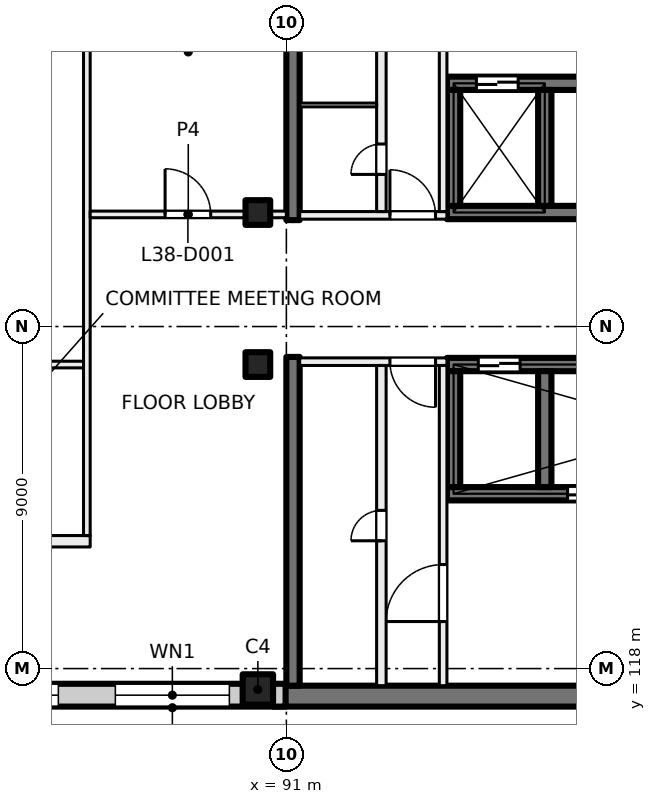
"""IFC4 building model, lengths in metres.
Left out: names, types, materials, properties, quantities, classifications, styles, units other than length and angle.
Written with IfcOpenShell. Run it as: python <this file> out.ifc"""

import sys

from ifc_helpers import new_model, si_unit, direction, frame, frame_2d, origin, origin_2d, place, context, subcontext, project, spatial, rectangle, extrude, element, fill, save


model = new_model("IFC4")
c1 = context("Model", 3, precision=1e-05, world=origin(), true_north=direction((0.0, 1.0)))
c2 = subcontext(c1, "Body", "Model", "MODEL_VIEW")
j1 = project(units=[si_unit("LENGTHUNIT", "METRE"), si_unit("PLANEANGLEUNIT", "RADIAN")], contexts=[c1])
p1 = place(None, origin())
s1 = spatial("IfcSite", under=j1, at=p1, CompositionType="ELEMENT")
p2 = place(p1, origin())
s2 = spatial("IfcBuilding", under=s1, at=p2, CompositionType="ELEMENT")
p3 = place(p2, frame((0.0, 0.0, 162.5)))
s3 = spatial("IfcBuildingStorey", under=s2, at=p3, CompositionType="ELEMENT", Elevation=162.5)
for number, where, z_axis, x_axis in (
    (1, (90.25, 130.0, 0.0), (0.0, 0.0, 1.0), (1.0, 0.0, 0.0)),
    (2, (90.25, 126.0, 0.0), (0.0, 0.0, 1.0), (1.0, 0.0, 0.0)),
):
    element("IfcColumn", number, at=place(p3, frame(where, z_axis=z_axis, x_axis=x_axis)), inside=s3, PredefinedType="COLUMN", context=c2, shape_type="SweptSolid", body=[
        extrude(rectangle(XDim=0.65, YDim=0.65, at=origin_2d()), origin(), (0.0, 0.0, 1.0), 4.0),
    ])
p4 = place(p3, frame((90.25, 117.45, 0.0), z_axis=(0.0, 0.0, 1.0), x_axis=(1.0, 0.0, 0.0)))
e3 = element("IfcColumn", 3, at=p4, inside=s3, PredefinedType="COLUMN", context=c2, shape_type="SweptSolid", body=[
    extrude(rectangle(XDim=0.8, YDim=0.8, at=origin_2d()), origin(), (0.0, 0.0, 1.0), 4.0),
])
p5 = place(p3, frame((99.6, 117.275, 0.0), z_axis=(0.0, 0.0, 1.0), x_axis=(-1.0, 0.0, 0.0)))
e4 = element("IfcWall", 4, at=p5, inside=s3, PredefinedType="SHEAR", context=c2, shape_type="SweptSolid", body=[
    extrude(rectangle(XDim=8.95, YDim=0.55, at=frame_2d((4.475, 0.0))), origin(), (0.0, 0.0, 1.0), 4.0),
])
p6 = place(p3, frame((107.45, 130.0, 0.0), z_axis=(0.0, 0.0, 1.0), x_axis=(-1.0, 0.0, 0.0)))
e5 = element("IfcWall", 5, at=p6, inside=s3, PredefinedType="SHEAR", context=c2, shape_type="SweptSolid", body=[
    extrude(rectangle(XDim=12.225, YDim=0.35, at=frame_2d((6.112, 0.0))), origin(), (0.0, 0.0, 1.0), 4.0),
])
p7 = place(p6, frame((0.85, 0.0, 0.0)))
e6 = element("IfcOpeningElement", 6, at=p7, cuts=e5, PredefinedType="OPENING", context=c2, shape_type="SweptSolid", body=[
    extrude(rectangle(XDim=0.8, YDim=2.1, at=frame_2d((0.4, 1.05))), frame((0.0, 0.185, 0.0), z_axis=(0.0, -1.0, 0.0), x_axis=(1.0, 0.0, 0.0)), (0.0, 0.0, 1.0), 0.37),
])
p8 = place(p6, frame((5.65, 0.0, 0.0)))
e7 = element("IfcOpeningElement", 7, at=p8, cuts=e5, PredefinedType="OPENING", context=c2, shape_type="SweptSolid", body=[
    extrude(rectangle(XDim=0.8, YDim=2.1, at=frame_2d((0.4, 1.05))), frame((0.0, 0.185, 0.0), z_axis=(0.0, -1.0, 0.0), x_axis=(1.0, 0.0, 0.0)), (0.0, 0.0, 1.0), 0.37),
])
p9 = place(p3, frame((107.45, 133.4, 0.0), z_axis=(0.0, 0.0, 1.0), x_axis=(-1.0, 0.0, 0.0)))
e8 = element("IfcWall", 8, at=p9, inside=s3, PredefinedType="SHEAR", context=c2, shape_type="SweptSolid", body=[
    extrude(rectangle(XDim=12.225, YDim=0.35, at=frame_2d((6.112, 0.0))), origin(), (0.0, 0.0, 1.0), 4.0),
])
p10 = place(p9, frame((10.35, 0.0, 0.0)))
e9 = element("IfcOpeningElement", 9, at=p10, cuts=e8, PredefinedType="OPENING", context=c2, shape_type="SweptSolid", body=[
    extrude(rectangle(XDim=1.1, YDim=2.1, at=frame_2d((0.55, 1.05))), frame((0.0, 0.185, 0.0), z_axis=(0.0, -1.0, 0.0), x_axis=(1.0, 0.0, 0.0)), (0.0, 0.0, 1.0), 0.37),
])
for number, where, z_axis, x_axis in (
    (10, (97.8, 133.225, 0.0), (0.0, 0.0, 1.0), (0.0, -1.0, 0.0)),
    (11, (95.4, 133.225, 0.0), (0.0, 0.0, 1.0), (0.0, -1.0, 0.0)),
):
    element("IfcWall", number, at=place(p3, frame(where, z_axis=z_axis, x_axis=x_axis)), inside=s3, PredefinedType="SHEAR", context=c2, shape_type="SweptSolid", body=[
        extrude(rectangle(XDim=3.05, YDim=0.35, at=frame_2d((1.525, 0.0))), origin(), (0.0, 0.0, 1.0), 4.0),
    ])
p11 = place(p3, frame((107.45, 126.0, 0.0), z_axis=(0.0, 0.0, 1.0), x_axis=(-1.0, 0.0, 0.0)))
e12 = element("IfcWall", 12, at=p11, inside=s3, PredefinedType="SHEAR", context=c2, shape_type="SweptSolid", body=[
    extrude(rectangle(XDim=12.225, YDim=0.35, at=frame_2d((6.112, 0.0))), origin(), (0.0, 0.0, 1.0), 4.0),
])
p12 = place(p11, frame((0.7, 0.0, 0.0)))
e13 = element("IfcOpeningElement", 13, at=p12, cuts=e12, PredefinedType="OPENING", context=c2, shape_type="SweptSolid", body=[
    extrude(rectangle(XDim=1.1, YDim=2.1, at=frame_2d((0.55, 1.05))), frame((0.0, 0.185, 0.0), z_axis=(0.0, -1.0, 0.0), x_axis=(1.0, 0.0, 0.0)), (0.0, 0.0, 1.0), 0.37),
])
p13 = place(p11, frame((3.1, 0.0, 0.0)))
e14 = element("IfcOpeningElement", 14, at=p13, cuts=e12, PredefinedType="OPENING", context=c2, shape_type="SweptSolid", body=[
    extrude(rectangle(XDim=1.1, YDim=2.1, at=frame_2d((0.55, 1.05))), frame((0.0, 0.185, 0.0), z_axis=(0.0, -1.0, 0.0), x_axis=(1.0, 0.0, 0.0)), (0.0, 0.0, 1.0), 0.37),
])
p14 = place(p11, frame((5.5, 0.0, 0.0)))
e15 = element("IfcOpeningElement", 15, at=p14, cuts=e12, PredefinedType="OPENING", context=c2, shape_type="SweptSolid", body=[
    extrude(rectangle(XDim=1.1, YDim=2.1, at=frame_2d((0.55, 1.05))), frame((0.0, 0.185, 0.0), z_axis=(0.0, -1.0, 0.0), x_axis=(1.0, 0.0, 0.0)), (0.0, 0.0, 1.0), 0.37),
])
p15 = place(p11, frame((10.3, 0.0, 0.0)))
e16 = element("IfcOpeningElement", 16, at=p15, cuts=e12, PredefinedType="OPENING", context=c2, shape_type="SweptSolid", body=[
    extrude(rectangle(XDim=1.1, YDim=2.1, at=frame_2d((0.55, 1.05))), frame((0.0, 0.185, 0.0), z_axis=(0.0, -1.0, 0.0), x_axis=(1.0, 0.0, 0.0)), (0.0, 0.0, 1.0), 0.37),
])
p16 = place(p3, frame((107.45, 122.6, 0.0), z_axis=(0.0, 0.0, 1.0), x_axis=(-1.0, 0.0, 0.0)))
e17 = element("IfcWall", 17, at=p16, inside=s3, PredefinedType="SHEAR", context=c2, shape_type="SweptSolid", body=[
    extrude(rectangle(XDim=12.225, YDim=0.35, at=frame_2d((6.112, 0.0))), origin(), (0.0, 0.0, 1.0), 4.0),
])
p17 = place(p16, frame((7.95, 0.0, 0.0)))
e18 = element("IfcOpeningElement", 18, at=p17, cuts=e17, PredefinedType="OPENING", context=c2, shape_type="SweptSolid", body=[
    extrude(rectangle(XDim=1.1, YDim=2.1, at=frame_2d((0.55, 1.05))), frame((0.0, 0.185, 0.0), z_axis=(0.0, -1.0, 0.0), x_axis=(1.0, 0.0, 0.0)), (0.0, 0.0, 1.0), 0.37),
])
for number, where, z_axis, x_axis in (
    (19, (97.8, 125.825, 0.0), (0.0, 0.0, 1.0), (0.0, -1.0, 0.0)),
    (20, (95.4, 125.825, 0.0), (0.0, 0.0, 1.0), (0.0, -1.0, 0.0)),
):
    element("IfcWall", number, at=place(p3, frame(where, z_axis=z_axis, x_axis=x_axis)), inside=s3, PredefinedType="SHEAR", context=c2, shape_type="SweptSolid", body=[
        extrude(rectangle(XDim=3.05, YDim=0.35, at=frame_2d((1.525, 0.0))), origin(), (0.0, 0.0, 1.0), 4.0),
    ])
for number, where, z_axis, x_axis in (
    (21, (91.175, 138.45, 0.0), (0.0, 0.0, 1.0), (0.0, -1.0, 0.0)),
    (22, (91.175, 126.2, 0.0), (0.0, 0.0, 1.0), (0.0, -1.0, 0.0)),
):
    element("IfcWall", number, at=place(p3, frame(where, z_axis=z_axis, x_axis=x_axis)), inside=s3, PredefinedType="SHEAR", context=c2, shape_type="SweptSolid", body=[
        extrude(rectangle(XDim=8.65, YDim=0.35, at=frame_2d((4.325, 0.0))), origin(), (0.0, 0.0, 1.0), 4.0),
    ])
p18 = place(p3, frame((90.98, 117.3, 0.0), z_axis=(0.0, 0.0, 1.0), x_axis=(-1.0, 0.0, 0.0)))
e23 = element("IfcWall", 23, at=p18, inside=s3, PredefinedType="SOLIDWALL", context=c2, shape_type="SweptSolid", body=[
    extrude(rectangle(XDim=33.745, YDim=0.6, at=frame_2d((16.873, 0.0))), origin(), (0.0, 0.0, 1.0), 3.625),
])
p19 = place(p18, frame((1.48, 0.0, 0.9)))
e24 = element("IfcOpeningElement", 24, at=p19, cuts=e23, PredefinedType="OPENING", context=c2, shape_type="SweptSolid", body=[
    extrude(rectangle(XDim=3.0, YDim=2.4, at=frame_2d((1.5, 1.2))), frame((0.0, 0.31, 0.0), z_axis=(0.0, -1.0, 0.0), x_axis=(1.0, 0.0, 0.0)), (0.0, 0.0, 1.0), 0.62),
])
p20 = place(p18, frame((5.98, 0.0, 0.9)))
e25 = element("IfcOpeningElement", 25, at=p20, cuts=e23, PredefinedType="OPENING", context=c2, shape_type="SweptSolid", body=[
    extrude(rectangle(XDim=3.0, YDim=2.4, at=frame_2d((1.5, 1.2))), frame((0.0, 0.31, 0.0), z_axis=(0.0, -1.0, 0.0), x_axis=(1.0, 0.0, 0.0)), (0.0, 0.0, 1.0), 0.62),
])
p21 = place(p18, frame((10.48, 0.0, 0.9)))
e26 = element("IfcOpeningElement", 26, at=p21, cuts=e23, PredefinedType="OPENING", context=c2, shape_type="SweptSolid", body=[
    extrude(rectangle(XDim=3.0, YDim=2.4, at=frame_2d((1.5, 1.2))), frame((0.0, 0.31, 0.0), z_axis=(0.0, -1.0, 0.0), x_axis=(1.0, 0.0, 0.0)), (0.0, 0.0, 1.0), 0.62),
])
p22 = place(p18, frame((14.98, 0.0, 0.9)))
e27 = element("IfcOpeningElement", 27, at=p22, cuts=e23, PredefinedType="OPENING", context=c2, shape_type="SweptSolid", body=[
    extrude(rectangle(XDim=3.0, YDim=2.4, at=frame_2d((1.5, 1.2))), frame((0.0, 0.31, 0.0), z_axis=(0.0, -1.0, 0.0), x_axis=(1.0, 0.0, 0.0)), (0.0, 0.0, 1.0), 0.62),
])
p23 = place(p18, frame((19.48, 0.0, 0.9)))
e28 = element("IfcOpeningElement", 28, at=p23, cuts=e23, PredefinedType="OPENING", context=c2, shape_type="SweptSolid", body=[
    extrude(rectangle(XDim=3.0, YDim=2.4, at=frame_2d((1.5, 1.2))), frame((0.0, 0.31, 0.0), z_axis=(0.0, -1.0, 0.0), x_axis=(1.0, 0.0, 0.0)), (0.0, 0.0, 1.0), 0.62),
])
p24 = place(p18, frame((23.98, 0.0, 0.9)))
e29 = element("IfcOpeningElement", 29, at=p24, cuts=e23, PredefinedType="OPENING", context=c2, shape_type="SweptSolid", body=[
    extrude(rectangle(XDim=3.0, YDim=2.4, at=frame_2d((1.5, 1.2))), frame((0.0, 0.31, 0.0), z_axis=(0.0, -1.0, 0.0), x_axis=(1.0, 0.0, 0.0)), (0.0, 0.0, 1.0), 0.62),
])
p25 = place(p18, frame((28.48, 0.0, 0.9)))
e30 = element("IfcOpeningElement", 30, at=p25, cuts=e23, PredefinedType="OPENING", context=c2, shape_type="SweptSolid", body=[
    extrude(rectangle(XDim=3.0, YDim=2.4, at=frame_2d((1.5, 1.2))), frame((0.0, 0.31, 0.0), z_axis=(0.0, -1.0, 0.0), x_axis=(1.0, 0.0, 0.0)), (0.0, 0.0, 1.0), 0.62),
])
p26 = place(p3, frame((95.225, 126.075, 0.0), z_axis=(0.0, 0.0, 1.0), x_axis=(-1.0, 0.0, 0.0)))
e31 = element("IfcWall", 31, at=p26, inside=s3, PredefinedType="PARTITIONING", context=c2, shape_type="SweptSolid", body=[
    extrude(rectangle(XDim=3.875, YDim=0.2, at=frame_2d((1.938, 0.0))), origin(), (0.0, 0.0, 1.0), 3.625),
])
p27 = place(p26, frame((0.3, 0.0, 0.0)))
e32 = element("IfcOpeningElement", 32, at=p27, cuts=e31, PredefinedType="OPENING", context=c2, shape_type="SweptSolid", body=[
    extrude(rectangle(XDim=1.2, YDim=2.1, at=frame_2d((0.6, 1.05))), frame((0.0, 0.11, 0.0), z_axis=(0.0, -1.0, 0.0), x_axis=(1.0, 0.0, 0.0)), (0.0, 0.0, 1.0), 0.22),
])
p28 = place(p3, frame((95.125, 117.55, 0.0), z_axis=(0.0, 0.0, 1.0), x_axis=(0.0, 1.0, 0.0)))
e33 = element("IfcWall", 33, at=p28, inside=s3, PredefinedType="PARTITIONING", context=c2, shape_type="SweptSolid", body=[
    extrude(rectangle(XDim=8.425, YDim=0.2, at=frame_2d((4.212, 0.0))), origin(), (0.0, 0.0, 1.0), 3.625),
])
p29 = place(p28, frame((1.688, 0.0, 0.0)))
e34 = element("IfcOpeningElement", 34, at=p29, cuts=e33, PredefinedType="OPENING", context=c2, shape_type="SweptSolid", body=[
    extrude(rectangle(XDim=1.5, YDim=2.1, at=frame_2d((0.75, 1.05))), frame((0.0, 0.11, 0.0), z_axis=(0.0, -1.0, 0.0), x_axis=(1.0, 0.0, 0.0)), (0.0, 0.0, 1.0), 0.22),
])
p30 = place(p3, frame((93.5, 117.55, 0.0), z_axis=(0.0, 0.0, 1.0), x_axis=(0.0, 1.0, 0.0)))
e35 = element("IfcWall", 35, at=p30, inside=s3, PredefinedType="PARTITIONING", context=c2, shape_type="SweptSolid", body=[
    extrude(rectangle(XDim=8.425, YDim=0.25, at=frame_2d((4.212, 0.0))), origin(), (0.0, 0.0, 1.0), 3.625),
])
p31 = place(p30, frame((3.812, 0.0, 0.0)))
e36 = element("IfcOpeningElement", 36, at=p31, cuts=e35, PredefinedType="OPENING", context=c2, shape_type="SweptSolid", body=[
    extrude(rectangle(XDim=0.8, YDim=2.1, at=frame_2d((0.4, 1.05))), frame((0.0, 0.135, 0.0), z_axis=(0.0, -1.0, 0.0), x_axis=(1.0, 0.0, 0.0)), (0.0, 0.0, 1.0), 0.27),
])
p32 = place(p3, frame((91.35, 129.925, 0.0), z_axis=(0.0, 0.0, 1.0), x_axis=(1.0, 0.0, 0.0)))
e37 = element("IfcWall", 37, at=p32, inside=s3, PredefinedType="PARTITIONING", context=c2, shape_type="SweptSolid", body=[
    extrude(rectangle(XDim=3.875, YDim=0.2, at=frame_2d((1.938, 0.0))), origin(), (0.0, 0.0, 1.0), 3.625),
])
p33 = place(p32, frame((2.375, 0.0, 0.0)))
e38 = element("IfcOpeningElement", 38, at=p33, cuts=e37, PredefinedType="OPENING", context=c2, shape_type="SweptSolid", body=[
    extrude(rectangle(XDim=1.2, YDim=2.1, at=frame_2d((0.6, 1.05))), frame((0.0, 0.11, 0.0), z_axis=(0.0, -1.0, 0.0), x_axis=(1.0, 0.0, 0.0)), (0.0, 0.0, 1.0), 0.22),
])
p34 = place(p3, frame((95.125, 130.025, 0.0), z_axis=(0.0, 0.0, 1.0), x_axis=(0.0, 1.0, 0.0)))
e39 = element("IfcWall", 39, at=p34, inside=s3, PredefinedType="PARTITIONING", context=c2, shape_type="SweptSolid", body=[
    extrude(rectangle(XDim=8.425, YDim=0.2, at=frame_2d((4.212, 0.0))), origin(), (0.0, 0.0, 1.0), 3.625),
])
p35 = place(p34, frame((5.238, 0.0, 0.0)))
e40 = element("IfcOpeningElement", 40, at=p35, cuts=e39, PredefinedType="OPENING", context=c2, shape_type="SweptSolid", body=[
    extrude(rectangle(XDim=1.5, YDim=2.1, at=frame_2d((0.75, 1.05))), frame((0.0, 0.11, 0.0), z_axis=(0.0, -1.0, 0.0), x_axis=(1.0, 0.0, 0.0)), (0.0, 0.0, 1.0), 0.22),
])
p36 = place(p3, frame((93.5, 130.025, 0.0), z_axis=(0.0, 0.0, 1.0), x_axis=(0.0, 1.0, 0.0)))
e41 = element("IfcWall", 41, at=p36, inside=s3, PredefinedType="PARTITIONING", context=c2, shape_type="SweptSolid", body=[
    extrude(rectangle(XDim=8.425, YDim=0.25, at=frame_2d((4.212, 0.0))), origin(), (0.0, 0.0, 1.0), 3.625),
])
p37 = place(p36, frame((0.978, 0.0, 0.0)))
e42 = element("IfcOpeningElement", 42, at=p37, cuts=e41, PredefinedType="OPENING", context=c2, shape_type="SweptSolid", body=[
    extrude(rectangle(XDim=0.8, YDim=2.1, at=frame_2d((0.4, 1.05))), frame((0.0, 0.135, 0.0), z_axis=(0.0, -1.0, 0.0), x_axis=(1.0, 0.0, 0.0)), (0.0, 0.0, 1.0), 0.27),
])
p38 = place(p36, frame((5.24, 0.0, 0.0)))
e43 = element("IfcOpeningElement", 43, at=p38, cuts=e41, PredefinedType="OPENING", context=c2, shape_type="SweptSolid", body=[
    extrude(rectangle(XDim=0.8, YDim=2.1, at=frame_2d((0.4, 1.05))), frame((0.0, 0.135, 0.0), z_axis=(0.0, -1.0, 0.0), x_axis=(1.0, 0.0, 0.0)), (0.0, 0.0, 1.0), 0.27),
])
p39 = place(p3, frame((91.35, 132.83, 0.0), z_axis=(0.0, 0.0, 1.0), x_axis=(1.0, 0.0, 0.0)))
e44 = element("IfcWall", 44, at=p39, inside=s3, PredefinedType="PARTITIONING", context=c2, shape_type="SweptSolid", body=[
    extrude(rectangle(XDim=2.025, YDim=0.1, at=frame_2d((1.012, 0.0))), origin(), (0.0, 0.0, 1.0), 3.625),
])
p40 = place(p3, frame((50.506, 121.35, 0.0), z_axis=(0.0, 0.0, 1.0), x_axis=(1.0, 0.0, 0.0)))
e45 = element("IfcWall", 45, at=p40, inside=s3, PredefinedType="PARTITIONING", context=c2, shape_type="SweptSolid", body=[
    extrude(rectangle(XDim=35.332, YDim=0.3, at=frame_2d((17.666, 0.0))), origin(), (0.0, 0.0, 1.0), 3.625),
])
p41 = place(p40, frame((30.894, 0.0, 0.0)))
e46 = element("IfcOpeningElement", 46, at=p41, cuts=e45, PredefinedType="OPENING", context=c2, shape_type="SweptSolid", body=[
    extrude(rectangle(XDim=1.2, YDim=2.1, at=frame_2d((0.6, 1.05))), frame((0.0, 0.16, 0.0), z_axis=(0.0, -1.0, 0.0), x_axis=(1.0, 0.0, 0.0)), (0.0, 0.0, 1.0), 0.32),
])
p42 = place(p40, frame((23.844, 0.0, 0.0)))
e47 = element("IfcOpeningElement", 47, at=p42, cuts=e45, PredefinedType="OPENING", context=c2, shape_type="SweptSolid", body=[
    extrude(rectangle(XDim=1.8, YDim=2.1, at=frame_2d((0.9, 1.05))), frame((0.0, 0.16, 0.0), z_axis=(0.0, -1.0, 0.0), x_axis=(1.0, 0.0, 0.0)), (0.0, 0.0, 1.0), 0.32),
])
p43 = place(p40, frame((18.144, 0.0, 0.0)))
e48 = element("IfcOpeningElement", 48, at=p43, cuts=e45, PredefinedType="OPENING", context=c2, shape_type="SweptSolid", body=[
    extrude(rectangle(XDim=1.2, YDim=2.1, at=frame_2d((0.6, 1.05))), frame((0.0, 0.16, 0.0), z_axis=(0.0, -1.0, 0.0), x_axis=(1.0, 0.0, 0.0)), (0.0, 0.0, 1.0), 0.32),
])
p44 = place(p40, frame((13.844, 0.0, 0.0)))
e49 = element("IfcOpeningElement", 49, at=p44, cuts=e45, PredefinedType="OPENING", context=c2, shape_type="SweptSolid", body=[
    extrude(rectangle(XDim=0.8, YDim=2.1, at=frame_2d((0.4, 1.05))), frame((0.0, 0.16, 0.0), z_axis=(0.0, -1.0, 0.0), x_axis=(1.0, 0.0, 0.0)), (0.0, 0.0, 1.0), 0.32),
])
p45 = place(p40, frame((7.344, 0.0, 0.0)))
e50 = element("IfcOpeningElement", 50, at=p45, cuts=e45, PredefinedType="OPENING", context=c2, shape_type="SweptSolid", body=[
    extrude(rectangle(XDim=1.8, YDim=2.1, at=frame_2d((0.9, 1.05))), frame((0.0, 0.16, 0.0), z_axis=(0.0, -1.0, 0.0), x_axis=(1.0, 0.0, 0.0)), (0.0, 0.0, 1.0), 0.32),
])
p46 = place(p40, frame((1.047, 0.0, 0.0)))
e51 = element("IfcOpeningElement", 51, at=p46, cuts=e45, PredefinedType="OPENING", context=c2, shape_type="SweptSolid", body=[
    extrude(rectangle(XDim=1.8, YDim=2.1, at=frame_2d((0.9, 1.05))), frame((0.0, 0.16, 0.0), z_axis=(0.0, -1.0, 0.0), x_axis=(1.0, 0.0, 0.0)), (0.0, 0.0, 1.0), 0.32),
])
p47 = place(p3, frame((78.162, 126.0, 0.0), z_axis=(0.0, 0.0, 1.0), x_axis=(1.0, 0.0, 0.0)))
e52 = element("IfcWall", 52, at=p47, inside=s3, PredefinedType="PARTITIONING", context=c2, shape_type="SweptSolid", body=[
    extrude(rectangle(XDim=7.5, YDim=0.175, at=frame_2d((3.75, 0.0))), origin(), (0.0, 0.0, 1.0), 3.625),
])
p48 = place(p3, frame((85.75, 121.5, 0.0), z_axis=(0.0, 0.0, 1.0), x_axis=(0.0, 1.0, 0.0)))
e53 = element("IfcWall", 53, at=p48, inside=s3, PredefinedType="PARTITIONING", context=c2, shape_type="SweptSolid", body=[
    extrude(rectangle(XDim=16.9, YDim=0.175, at=frame_2d((8.45, 0.0))), origin(), (0.0, 0.0, 1.0), 3.625),
])
p49 = place(p3, frame((85.838, 129.95, 0.0), z_axis=(0.0, 0.0, 1.0), x_axis=(1.0, 0.0, 0.0)))
e54 = element("IfcWall", 54, at=p49, inside=s3, PredefinedType="PARTITIONING", context=c2, shape_type="SweptSolid", body=[
    extrude(rectangle(XDim=5.162, YDim=0.175, at=frame_2d((2.581, 0.0))), origin(), (0.0, 0.0, 1.0), 3.625),
])
p50 = place(p49, frame((1.971, 0.0, 0.0)))
e55 = element("IfcOpeningElement", 55, at=p50, cuts=e54, PredefinedType="OPENING", context=c2, shape_type="SweptSolid", body=[
    extrude(rectangle(XDim=1.2, YDim=2.1, at=frame_2d((0.6, 1.05))), frame((0.0, 0.097, 0.0), z_axis=(0.0, -1.0, 0.0), x_axis=(1.0, 0.0, 0.0)), (0.0, 0.0, 1.0), 0.195),
])
p51 = place(p19, origin())
e56 = element("IfcWindow", 56, at=p51, inside=s3, PartitioningType="SINGLE_PANEL", PredefinedType="WINDOW", context=c2, shape_type="SweptSolid", body=[
    extrude(rectangle(XDim=3.0, YDim=2.4, at=frame_2d((1.5, 1.2))), frame((0.0, 0.03, 0.0), z_axis=(0.0, -1.0, 0.0), x_axis=(1.0, 0.0, 0.0)), (0.0, 0.0, 1.0), 0.06),
])
fill(e24, e56)
p52 = place(p20, origin())
e57 = element("IfcWindow", 57, at=p52, inside=s3, PartitioningType="SINGLE_PANEL", PredefinedType="WINDOW", context=c2, shape_type="SweptSolid", body=[
    extrude(rectangle(XDim=3.0, YDim=2.4, at=frame_2d((1.5, 1.2))), frame((0.0, 0.03, 0.0), z_axis=(0.0, -1.0, 0.0), x_axis=(1.0, 0.0, 0.0)), (0.0, 0.0, 1.0), 0.06),
])
fill(e25, e57)
p53 = place(p15, origin())
e58 = element("IfcDoor", 58, at=p53, inside=s3, OperationType="DOUBLE_DOOR_SLIDING", PredefinedType="DOOR", context=c2, shape_type="SweptSolid", body=[
    extrude(rectangle(XDim=1.1, YDim=2.1, at=frame_2d((0.55, 1.05))), frame((0.0, 0.025, 0.0), z_axis=(0.0, -1.0, 0.0), x_axis=(1.0, 0.0, 0.0)), (0.0, 0.0, 1.0), 0.05),
])
fill(e16, e58)
p54 = place(p27, origin())
e59 = element("IfcDoor", 59, at=p54, inside=s3, OperationType="DOUBLE_DOOR_SINGLE_SWING", PredefinedType="DOOR", context=c2, shape_type="SweptSolid", body=[
    extrude(rectangle(XDim=1.2, YDim=2.1, at=frame_2d((0.6, 1.05))), frame((0.0, 0.025, 0.0), z_axis=(0.0, -1.0, 0.0), x_axis=(1.0, 0.0, 0.0)), (0.0, 0.0, 1.0), 0.05),
])
fill(e32, e59)
p55 = place(p29, origin())
e60 = element("IfcDoor", 60, at=p55, inside=s3, OperationType="DOUBLE_DOOR_SINGLE_SWING", PredefinedType="DOOR", context=c2, shape_type="SweptSolid", body=[
    extrude(rectangle(XDim=1.5, YDim=2.1, at=frame_2d((0.75, 1.05))), frame((0.0, 0.025, 0.0), z_axis=(0.0, -1.0, 0.0), x_axis=(1.0, 0.0, 0.0)), (0.0, 0.0, 1.0), 0.05),
])
fill(e34, e60)
p56 = place(p31, origin())
e61 = element("IfcDoor", 61, at=p56, inside=s3, OperationType="SINGLE_SWING_LEFT", PredefinedType="DOOR", context=c2, shape_type="SweptSolid", body=[
    extrude(rectangle(XDim=0.8, YDim=2.1, at=frame_2d((0.4, 1.05))), frame((0.0, 0.025, 0.0), z_axis=(0.0, -1.0, 0.0), x_axis=(1.0, 0.0, 0.0)), (0.0, 0.0, 1.0), 0.05),
])
fill(e36, e61)
p57 = place(p33, origin())
e62 = element("IfcDoor", 62, at=p57, inside=s3, OperationType="DOUBLE_DOOR_SINGLE_SWING", PredefinedType="DOOR", context=c2, shape_type="SweptSolid", body=[
    extrude(rectangle(XDim=1.2, YDim=2.1, at=frame_2d((0.6, 1.05))), frame((0.0, 0.025, 0.0), z_axis=(0.0, -1.0, 0.0), x_axis=(1.0, 0.0, 0.0)), (0.0, 0.0, 1.0), 0.05),
])
fill(e38, e62)
p58 = place(p37, origin())
e63 = element("IfcDoor", 63, at=p58, inside=s3, OperationType="SINGLE_SWING_RIGHT", PredefinedType="DOOR", context=c2, shape_type="SweptSolid", body=[
    extrude(rectangle(XDim=0.8, YDim=2.1, at=frame_2d((0.4, 1.05))), frame((0.0, 0.025, 0.0), z_axis=(0.0, -1.0, 0.0), x_axis=(1.0, 0.0, 0.0)), (0.0, 0.0, 1.0), 0.05),
])
fill(e42, e63)
p59 = place(p10, origin())
e64 = element("IfcDoor", 64, at=p59, inside=s3, OperationType="DOUBLE_DOOR_SLIDING", PredefinedType="DOOR", context=c2, shape_type="SweptSolid", body=[
    extrude(rectangle(XDim=1.1, YDim=2.1, at=frame_2d((0.55, 1.05))), frame((0.0, 0.025, 0.0), z_axis=(0.0, -1.0, 0.0), x_axis=(1.0, 0.0, 0.0)), (0.0, 0.0, 1.0), 0.05),
])
fill(e9, e64)
p60 = place(p17, origin())
e65 = element("IfcDoor", 65, at=p60, inside=s3, OperationType="DOUBLE_DOOR_SLIDING", PredefinedType="DOOR", context=c2, shape_type="SweptSolid", body=[
    extrude(rectangle(XDim=1.1, YDim=2.1, at=frame_2d((0.55, 1.05))), frame((0.0, 0.025, 0.0), z_axis=(0.0, -1.0, 0.0), x_axis=(1.0, 0.0, 0.0)), (0.0, 0.0, 1.0), 0.05),
])
fill(e18, e65)
p61 = place(p50, origin())
e66 = element("IfcDoor", 66, at=p61, inside=s3, OperationType="DOUBLE_DOOR_SINGLE_SWING", PredefinedType="DOOR", context=c2, shape_type="SweptSolid", body=[
    extrude(rectangle(XDim=1.2, YDim=2.1, at=frame_2d((0.6, 1.05))), frame((0.0, 0.025, 0.0), z_axis=(0.0, -1.0, 0.0), x_axis=(1.0, 0.0, 0.0)), (0.0, 0.0, 1.0), 0.05),
])
fill(e55, e66)
save(model, sys.argv[1])
